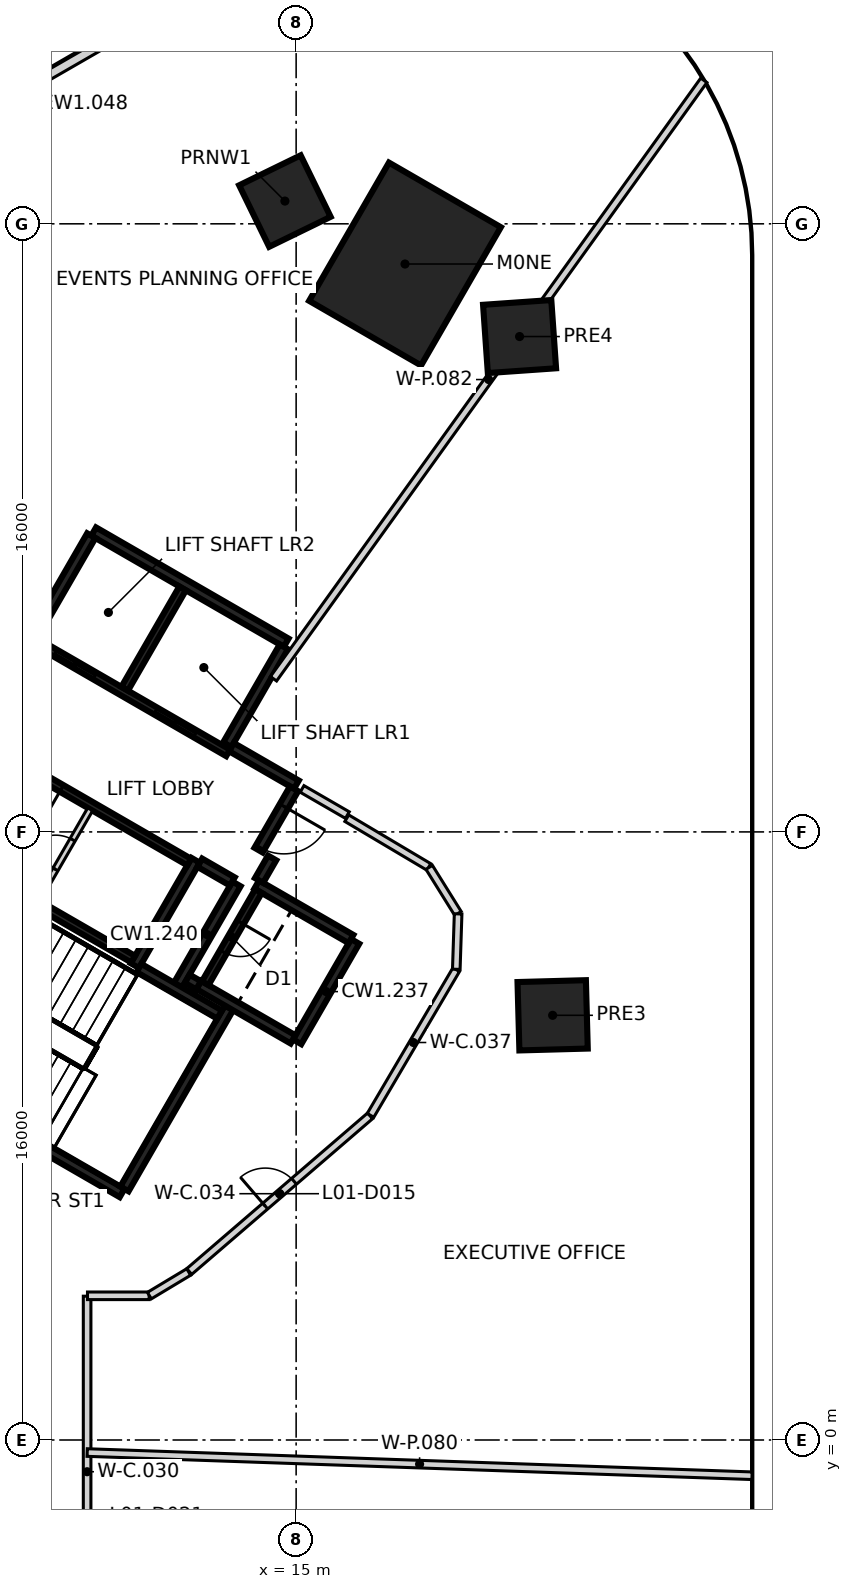
"""IFC4 building model, lengths in metres.
Left out: names, types, materials, properties, quantities, classifications, styles, units other than length and angle.
Written with IfcOpenShell. Run it as: python <this file> out.ifc"""

import sys

from ifc_helpers import new_model, si_unit, direction, frame, frame_2d, origin, origin_2d, place, context, subcontext, project, spatial, polyline, rectangle, outline, extrude, element, fill, save


model = new_model("IFC4")
c1 = context("Model", 3, precision=1e-05, world=origin(), true_north=direction((0.0, 1.0)))
c2 = subcontext(c1, "Body", "Model", "MODEL_VIEW")
j1 = project(units=[si_unit("LENGTHUNIT", "METRE"), si_unit("PLANEANGLEUNIT", "RADIAN")], contexts=[c1])
p1 = place(None, origin())
s1 = spatial("IfcSite", under=j1, at=p1, CompositionType="ELEMENT")
p2 = place(p1, origin())
s2 = spatial("IfcBuilding", under=s1, at=p2, CompositionType="ELEMENT")
p3 = place(p2, frame((0.0, 0.0, 7.5)))
s3 = spatial("IfcBuildingStorey", under=s2, at=p3, CompositionType="ELEMENT", Elevation=7.5)
p4 = place(p3, frame((17.865, 30.942, -0.4), z_axis=(0.0, 0.0, 1.0), x_axis=(0.5, 0.866025403784, 0.0)))
e1 = element("IfcColumn", 1, at=p4, inside=s3, PredefinedType="COLUMN", context=c2, shape_type="SweptSolid", body=[
    extrude(rectangle(XDim=4.2, YDim=3.4, at=origin_2d()), origin(), (0.0, 0.0, 1.0), 6.55),
])
for number, where, z_axis, x_axis in (
    (2, (21.749, 11.174, -0.4), (0.0, 0.0, 1.0), (1.0, 0.027, 0.0)),
    (3, (20.879, 29.034, -0.4), (0.0, 0.0, 1.0), (0.998, 0.07, 0.0)),
    (4, (14.705, 32.599, -0.4), (0.0, 0.0, 1.0), (-0.438, 0.899, 0.0)),
):
    element("IfcColumn", number, at=place(p3, frame(where, z_axis=z_axis, x_axis=x_axis)), inside=s3, PredefinedType="COLUMN", context=c2, shape_type="SweptSolid", body=[
        extrude(rectangle(XDim=1.8, YDim=1.8, at=origin_2d()), origin(), (0.0, 0.0, 1.0), 4.15),
    ])
p5 = place(p3, origin())
e5 = element("IfcWall", 5, at=p5, inside=s3, PredefinedType="SOLIDWALL", context=c2, shape_type="SweptSolid", body=[
    extrude(outline(polyline([(27.0, 31.177), (26.981, 31.766), (26.827, 32.933), (26.522, 34.07), (26.072, 35.157), (25.483, 36.177), (24.767, 37.111), (23.934, 37.943), (23.479, 38.317), (22.5, 38.971), (21.444, 39.492), (20.329, 39.87), (19.175, 40.1), (18.0, 40.177), (16.825, 40.1), (16.244, 40.004), (15.107, 39.699), (14.019, 39.249), (14.115, 39.018), (15.188, 39.462), (16.297, 39.759), (16.854, 39.851), (18.0, 39.926), (19.142, 39.852), (20.265, 39.628), (21.348, 39.26), (22.375, 38.754), (23.33, 38.116), (23.766, 37.758), (24.578, 36.946), (25.275, 36.038), (25.847, 35.047), (26.285, 33.989), (26.581, 32.884), (26.731, 31.745), (26.75, 31.169), (27.0, 31.177)])), origin(), (0.0, 0.0, 1.0), 6.15),
])
p6 = place(p3, frame((6.078, 34.524, 0.0), z_axis=(0.0, 0.0, 1.0), x_axis=(0.866216377649, 0.499669077583, 0.0)))
e6 = element("IfcWall", 6, at=p6, inside=s3, PredefinedType="SOLIDWALL", context=c2, shape_type="SweptSolid", body=[
    extrude(rectangle(XDim=4.62, YDim=0.25, at=frame_2d((2.31, 0.0))), origin(), (0.0, 0.0, 1.0), 6.15),
])
p7 = place(p3, frame((10.42, 6.498, 0.0), z_axis=(0.0, 0.0, 1.0), x_axis=(-0.866021906294, 0.500006057782, 0.0)))
e7 = element("IfcWall", 7, at=p7, inside=s3, PredefinedType="SHEAR", context=c2, shape_type="SweptSolid", body=[
    extrude(rectangle(XDim=11.55, YDim=0.25, at=frame_2d((5.775, 0.0))), origin(), (0.0, 0.0, 1.0), 6.15),
])
p8 = place(p7, frame((10.025, 0.0, 0.0)))
e8 = element("IfcOpeningElement", 8, at=p8, cuts=e7, PredefinedType="OPENING", context=c2, shape_type="SweptSolid", body=[
    extrude(rectangle(XDim=1.2, YDim=2.1, at=frame_2d((0.6, 1.05))), frame((0.0, 0.135, 0.0), z_axis=(0.0, -1.0, 0.0), x_axis=(1.0, 0.0, 0.0)), (0.0, 0.0, 1.0), 0.27),
])
p9 = place(p7, frame((8.725, 0.0, 0.0)))
e9 = element("IfcOpeningElement", 9, at=p9, cuts=e7, PredefinedType="OPENING", context=c2, shape_type="SweptSolid", body=[
    extrude(rectangle(XDim=1.2, YDim=2.1, at=frame_2d((0.6, 1.05))), frame((0.0, 0.135, 0.0), z_axis=(0.0, -1.0, 0.0), x_axis=(1.0, 0.0, 0.0)), (0.0, 0.0, 1.0), 0.27),
])
p10 = place(p3, frame((9.673, 23.903, 0.0), z_axis=(0.0, 0.0, 1.0), x_axis=(0.86603616409, -0.499981362141, 0.0)))
e10 = element("IfcWall", 10, at=p10, inside=s3, PredefinedType="SHEAR", context=c2, shape_type="SweptSolid", body=[
    extrude(rectangle(XDim=5.85, YDim=0.25, at=frame_2d((2.925, 0.0))), origin(), (0.0, 0.0, 1.0), 6.15),
])
p11 = place(p3, frame((13.238, 11.378, 0.0), z_axis=(0.0, 0.0, 1.0), x_axis=(-0.500008851346, -0.866020293397, 0.0)))
e11 = element("IfcWall", 11, at=p11, inside=s3, PredefinedType="SHEAR", context=c2, shape_type="SweptSolid", body=[
    extrude(rectangle(XDim=5.51, YDim=0.25, at=frame_2d((2.755, 0.0))), origin(), (0.0, 0.0, 1.0), 6.15),
])
p12 = place(p3, frame((12.357, 15.252, 0.0), z_axis=(0.0, 0.0, 1.0), x_axis=(-0.500028443584, -0.866008981251, 0.0)))
e12 = element("IfcWall", 12, at=p12, inside=s3, PredefinedType="SHEAR", context=c2, shape_type="SweptSolid", body=[
    extrude(rectangle(XDim=3.2, YDim=0.25, at=frame_2d((1.6, 0.0))), origin(), (0.0, 0.0, 1.0), 6.15),
])
for number, where, z_axis, x_axis in (
    (13, (8.123, 21.219, 0.0), (0.0, 0.0, 1.0), (0.5, 0.866, 0.0)),
    (14, (14.676, 20.87, 0.0), (0.0, 0.0, 1.0), (-0.5, -0.866, 0.0)),
):
    element("IfcWall", number, at=place(p3, frame(where, z_axis=z_axis, x_axis=x_axis)), inside=s3, PredefinedType="SHEAR", context=c2, shape_type="SweptSolid", body=[
        extrude(rectangle(XDim=2.975, YDim=0.25, at=frame_2d((1.487, 0.0))), origin(), (0.0, 0.0, 1.0), 6.15),
    ])
p13 = place(p3, frame((16.552, 13.119, 0.0), z_axis=(0.0, 0.0, 1.0), x_axis=(-0.499978833458, -0.866037623948, 0.0)))
e15 = element("IfcWall", 15, at=p13, inside=s3, PredefinedType="SHEAR", context=c2, shape_type="SweptSolid", body=[
    extrude(rectangle(XDim=3.05, YDim=0.25, at=frame_2d((1.525, 0.0))), origin(), (0.0, 0.0, 1.0), 6.15),
])
p14 = place(p3, frame((14.918, 10.54, 0.0), z_axis=(0.0, 0.0, 1.0), x_axis=(-0.866063538972, 0.499933942099, 0.0)))
e16 = element("IfcWall", 16, at=p14, inside=s3, PredefinedType="SHEAR", context=c2, shape_type="SweptSolid", body=[
    extrude(rectangle(XDim=2.865, YDim=0.25, at=frame_2d((1.432, 0.0))), origin(), (0.0, 0.0, 1.0), 6.15),
])
p15 = place(p3, frame((13.963, 14.614, 0.0), z_axis=(0.0, 0.0, 1.0), x_axis=(0.866042235819, -0.499970844928, 0.0)))
e17 = element("IfcWall", 17, at=p15, inside=s3, PredefinedType="SHEAR", context=c2, shape_type="SweptSolid", body=[
    extrude(rectangle(XDim=2.865, YDim=0.25, at=frame_2d((1.432, 0.0))), origin(), (0.0, 0.0, 1.0), 6.15),
])
p16 = place(p3, frame((11.888, 11.961, 0.0), z_axis=(0.0, 0.0, 1.0), x_axis=(0.500003324108, 0.866023484601, 0.0)))
e18 = element("IfcWall", 18, at=p16, inside=s3, PredefinedType="SHEAR", context=c2, shape_type="SweptSolid", body=[
    extrude(rectangle(XDim=3.085, YDim=0.25, at=frame_2d((1.542, 0.0))), origin(), (0.0, 0.0, 1.0), 6.15),
])
p17 = place(p3, frame((10.865, 12.418, 0.0), z_axis=(0.0, 0.0, 1.0), x_axis=(0.866026229868, -0.499998569178, 0.0)))
e19 = element("IfcWall", 19, at=p17, inside=s3, PredefinedType="SHEAR", context=c2, shape_type="SweptSolid", body=[
    extrude(rectangle(XDim=2.449, YDim=0.25, at=frame_2d((1.225, 0.0))), origin(), (0.0, 0.0, 1.0), 6.15),
])
p18 = place(p3, frame((13.297, 18.231, 0.0), z_axis=(0.0, 0.0, 1.0), x_axis=(0.866043531843, -0.499968599967, 0.0)))
e20 = element("IfcWall", 20, at=p18, inside=s3, PredefinedType="SHEAR", context=c2, shape_type="SweptSolid", body=[
    extrude(rectangle(XDim=1.975, YDim=0.25, at=frame_2d((0.987, 0.0))), origin(), (0.0, 0.0, 1.0), 6.15),
])
p19 = place(p3, frame((14.945, 17.135, 0.0), z_axis=(0.0, 0.0, 1.0), x_axis=(-0.499983108224, -0.866035156036, 0.0)))
e21 = element("IfcWall", 21, at=p19, inside=s3, PredefinedType="SHEAR", context=c2, shape_type="SweptSolid", body=[
    extrude(rectangle(XDim=1.865, YDim=0.25, at=frame_2d((0.932, 0.0))), origin(), (0.0, 0.0, 1.0), 6.15),
])
p20 = place(p19, frame((0.535, 0.0, 0.0)))
e22 = element("IfcOpeningElement", 22, at=p20, cuts=e21, PredefinedType="OPENING", context=c2, shape_type="SweptSolid", body=[
    extrude(rectangle(XDim=1.25, YDim=2.1, at=frame_2d((0.625, 1.05))), frame((0.0, 0.135, 0.0), z_axis=(0.0, -1.0, 0.0), x_axis=(1.0, 0.0, 0.0)), (0.0, 0.0, 1.0), 0.27),
])
p21 = place(p3, frame((13.322, 14.695, 0.0), z_axis=(0.0, 0.0, 1.0), x_axis=(-0.866017078145, 0.500014420154, 0.0)))
e23 = element("IfcWall", 23, at=p21, inside=s3, PredefinedType="SHEAR", context=c2, shape_type="SweptSolid", body=[
    extrude(rectangle(XDim=0.989, YDim=0.25, at=frame_2d((0.495, 0.0))), origin(), (0.0, 0.0, 1.0), 6.15),
])
p22 = place(p3, frame((14.368, 15.315, 0.0), z_axis=(0.0, 0.0, 1.0), x_axis=(-0.499897359611, -0.866084655132, 0.0)))
e24 = element("IfcWall", 24, at=p22, inside=s3, PredefinedType="SHEAR", context=c2, shape_type="SweptSolid", body=[
    extrude(rectangle(XDim=0.685, YDim=0.25, at=frame_2d((0.342, 0.0))), origin(), (0.0, 0.0, 1.0), 6.15),
])
p23 = place(p3, frame((12.433, 11.964, 0.0), z_axis=(0.0, 0.0, 1.0), x_axis=(-0.866055875208, 0.499947218231, 0.0)))
e25 = element("IfcWall", 25, at=p23, inside=s3, PredefinedType="SHEAR", context=c2, shape_type="SweptSolid", body=[
    extrude(rectangle(XDim=0.345, YDim=0.25, at=frame_2d((0.172, 0.0))), origin(), (0.0, 0.0, 1.0), 6.15),
])
p24 = place(p3, frame((13.21, 18.08, 0.0), z_axis=(0.0, 0.0, 1.0), x_axis=(-0.866030299012, 0.499991521122, 0.0)))
e26 = element("IfcWall", 26, at=p24, inside=s3, PredefinedType="SHEAR", context=c2, shape_type="SweptSolid", body=[
    extrude(rectangle(XDim=6.1, YDim=0.2, at=frame_2d((3.05, 0.0))), origin(), (0.0, 0.0, 1.0), 6.15),
])
p25 = place(p24, frame((1.0, 0.0, 0.0)))
e27 = element("IfcOpeningElement", 27, at=p25, cuts=e26, PredefinedType="OPENING", context=c2, shape_type="SweptSolid", body=[
    extrude(rectangle(XDim=1.2, YDim=2.1, at=frame_2d((0.6, 1.05))), frame((0.0, 0.11, 0.0), z_axis=(0.0, -1.0, 0.0), x_axis=(1.0, 0.0, 0.0)), (0.0, 0.0, 1.0), 0.22),
])
p26 = place(p24, frame((4.05, 0.0, 0.0)))
e28 = element("IfcOpeningElement", 28, at=p26, cuts=e26, PredefinedType="OPENING", context=c2, shape_type="SweptSolid", body=[
    extrude(rectangle(XDim=1.2, YDim=2.1, at=frame_2d((0.6, 1.05))), frame((0.0, 0.11, 0.0), z_axis=(0.0, -1.0, 0.0), x_axis=(1.0, 0.0, 0.0)), (0.0, 0.0, 1.0), 0.22),
])
p27 = place(p3, frame((5.775, 15.502, 0.0), z_axis=(0.0, 0.0, 1.0), x_axis=(0.866020080793, -0.500009219579, 0.0)))
e29 = element("IfcWall", 29, at=p27, inside=s3, PredefinedType="SHEAR", context=c2, shape_type="SweptSolid", body=[
    extrude(rectangle(XDim=5.699, YDim=0.2, at=frame_2d((2.85, 0.0))), origin(), (0.0, 0.0, 1.0), 6.15),
])
p28 = place(p3, frame((12.185, 15.207, 0.0), z_axis=(0.0, 0.0, 1.0), x_axis=(-0.866020080793, 0.500009219579, 0.0)))
e30 = element("IfcWall", 30, at=p28, inside=s3, PredefinedType="SHEAR", context=c2, shape_type="SweptSolid", body=[
    extrude(rectangle(XDim=5.699, YDim=0.2, at=frame_2d((2.85, 0.0))), origin(), (0.0, 0.0, 1.0), 6.15),
])
p29 = place(p28, frame((3.874, 0.0, 0.0)))
e31 = element("IfcOpeningElement", 31, at=p29, cuts=e30, PredefinedType="OPENING", context=c2, shape_type="SweptSolid", body=[
    extrude(rectangle(XDim=0.9, YDim=2.1, at=frame_2d((0.45, 1.05))), frame((0.0, 0.11, 0.0), z_axis=(0.0, -1.0, 0.0), x_axis=(1.0, 0.0, 0.0)), (0.0, 0.0, 1.0), 0.22),
])
p30 = place(p3, frame((10.489, 19.767, 0.0), z_axis=(0.0, 0.0, 1.0), x_axis=(0.499946628782, 0.866056215479, 0.0)))
e32 = element("IfcWall", 32, at=p30, inside=s3, PredefinedType="SHEAR", context=c2, shape_type="SweptSolid", body=[
    extrude(rectangle(XDim=3.048, YDim=0.2, at=frame_2d((1.524, 0.0))), origin(), (0.0, 0.0, 1.0), 6.15),
])
p31 = place(p3, frame((14.008, 14.442, 0.0), z_axis=(0.0, 0.0, 1.0), x_axis=(-0.499986818241, -0.866033014143, 0.0)))
e33 = element("IfcWall", 33, at=p31, inside=s3, PredefinedType="SHEAR", context=c2, shape_type="SweptSolid", body=[
    extrude(rectangle(XDim=2.798, YDim=0.2, at=frame_2d((1.399, 0.0))), origin(), (0.0, 0.0, 1.0), 6.15),
])
p32 = place(p31, frame((0.949, 0.0, 0.0)))
e34 = element("IfcOpeningElement", 34, at=p32, cuts=e33, PredefinedType="OPENING", context=c2, shape_type="SweptSolid", body=[
    extrude(rectangle(XDim=0.9, YDim=2.1, at=frame_2d((0.45, 1.05))), frame((0.0, 0.11, 0.0), z_axis=(0.0, -1.0, 0.0), x_axis=(1.0, 0.0, 0.0)), (0.0, 0.0, 1.0), 0.22),
])
p33 = place(p3, frame((8.207, 14.214, 0.0), z_axis=(0.0, 0.0, 1.0), x_axis=(0.499922376475, 0.866070215109, 0.0)))
e35 = element("IfcWall", 35, at=p33, inside=s3, PredefinedType="PARTITIONING", context=c2, shape_type="SweptSolid", body=[
    extrude(rectangle(XDim=2.749, YDim=0.15, at=frame_2d((1.374, 0.0))), origin(), (0.0, 0.0, 1.0), 6.15),
])
p34 = place(p33, frame((0.924, 0.0, 0.0)))
e36 = element("IfcOpeningElement", 36, at=p34, cuts=e35, PredefinedType="OPENING", context=c2, shape_type="SweptSolid", body=[
    extrude(rectangle(XDim=0.9, YDim=2.1, at=frame_2d((0.45, 1.05))), frame((0.0, 0.085, 0.0), z_axis=(0.0, -1.0, 0.0), x_axis=(1.0, 0.0, 0.0)), (0.0, 0.0, 1.0), 0.17),
])
p35 = place(p3, frame((9.5, -5.454, 0.0), z_axis=(0.0, 0.0, 1.0), x_axis=(0.0, 1.0, 0.0)))
e37 = element("IfcWall", 37, at=p35, inside=s3, PredefinedType="PARTITIONING", context=c2, shape_type="SweptSolid", body=[
    extrude(rectangle(XDim=9.238, YDim=0.2, at=frame_2d((4.619, 0.0))), origin(), (0.0, 0.0, 1.0), 6.15),
])
p36 = place(p35, frame((2.067, 0.0, 0.0)))
e38 = element("IfcOpeningElement", 38, at=p36, cuts=e37, PredefinedType="OPENING", context=c2, shape_type="SweptSolid", body=[
    extrude(rectangle(XDim=1.0, YDim=2.1, at=frame_2d((0.5, 1.05))), frame((0.0, 0.11, 0.0), z_axis=(0.0, -1.0, 0.0), x_axis=(1.0, 0.0, 0.0)), (0.0, 0.0, 1.0), 0.22),
])
p37 = place(p3, frame((9.51, 3.794, 0.0), z_axis=(0.0, 0.0, 1.0), x_axis=(1.0, 0.0, 0.0)))
e39 = element("IfcWall", 39, at=p37, inside=s3, PredefinedType="PARTITIONING", context=c2, shape_type="SweptSolid", body=[
    extrude(rectangle(XDim=1.622, YDim=0.2, at=frame_2d((0.811, 0.0))), origin(), (0.0, 0.0, 1.0), 6.15),
])
p38 = place(p3, frame((11.138, 3.799, 0.0), z_axis=(0.0, 0.0, 1.0), x_axis=(0.857225224173, 0.514941661785, 0.0)))
e40 = element("IfcWall", 40, at=p38, inside=s3, PredefinedType="PARTITIONING", context=c2, shape_type="SweptSolid", body=[
    extrude(rectangle(XDim=1.208, YDim=0.2, at=frame_2d((0.604, 0.0))), origin(), (0.0, 0.0, 1.0), 6.15),
])
p39 = place(p3, frame((12.187, 4.433, 0.0), z_axis=(0.0, 0.0, 1.0), x_axis=(0.757945584444, 0.652317783769, 0.0)))
e41 = element("IfcWall", 41, at=p39, inside=s3, PredefinedType="PARTITIONING", context=c2, shape_type="SweptSolid", body=[
    extrude(rectangle(XDim=6.278, YDim=0.2, at=frame_2d((3.139, 0.0))), origin(), (0.0, 0.0, 1.0), 6.15),
])
p40 = place(p39, frame((2.639, 0.0, 0.0)))
e42 = element("IfcOpeningElement", 42, at=p40, cuts=e41, PredefinedType="OPENING", context=c2, shape_type="SweptSolid", body=[
    extrude(rectangle(XDim=1.0, YDim=2.1, at=frame_2d((0.5, 1.05))), frame((0.0, 0.11, 0.0), z_axis=(0.0, -1.0, 0.0), x_axis=(1.0, 0.0, 0.0)), (0.0, 0.0, 1.0), 0.22),
])
p41 = place(p3, frame((15.156, 17.131, 0.0), z_axis=(0.0, 0.0, 1.0), x_axis=(0.865567897455, -0.500791588284, 0.0)))
e43 = element("IfcWall", 43, at=p41, inside=s3, PredefinedType="PARTITIONING", context=c2, shape_type="SweptSolid", body=[
    extrude(rectangle(XDim=1.377, YDim=0.2, at=frame_2d((0.688, 0.0))), origin(), (0.0, 0.0, 1.0), 6.15),
])
p42 = place(p3, frame((16.333, 16.361, 0.0), z_axis=(0.0, 0.0, 1.0), x_axis=(0.859621281652, -0.510931748995, 0.0)))
e44 = element("IfcWall", 44, at=p42, inside=s3, PredefinedType="PARTITIONING", context=c2, shape_type="SweptSolid", body=[
    extrude(rectangle(XDim=2.511, YDim=0.2, at=frame_2d((1.256, 0.0))), origin(), (0.0, 0.0, 1.0), 6.15),
])
p43 = place(p3, frame((16.957, 8.542, 0.0), z_axis=(0.0, 0.0, 1.0), x_axis=(0.506952960322, 0.861973721189, 0.0)))
e45 = element("IfcWall", 45, at=p43, inside=s3, PredefinedType="PARTITIONING", context=c2, shape_type="SweptSolid", body=[
    extrude(rectangle(XDim=4.448, YDim=0.2, at=frame_2d((2.224, 0.0))), origin(), (0.0, 0.0, 1.0), 6.15),
])
p44 = place(p3, frame((18.501, 15.068, 0.0), z_axis=(0.0, 0.0, 1.0), x_axis=(0.529124417946, -0.84854425361, 0.0)))
e46 = element("IfcWall", 46, at=p44, inside=s3, PredefinedType="PARTITIONING", context=c2, shape_type="SweptSolid", body=[
    extrude(rectangle(XDim=1.431, YDim=0.2, at=frame_2d((0.715, 0.0))), origin(), (0.0, 0.0, 1.0), 6.15),
])
p45 = place(p3, frame((19.214, 12.385, 0.0), z_axis=(0.0, 0.0, 1.0), x_axis=(0.032802164331, 0.999461864213, 0.0)))
e47 = element("IfcWall", 47, at=p45, inside=s3, PredefinedType="PARTITIONING", context=c2, shape_type="SweptSolid", body=[
    extrude(rectangle(XDim=1.459, YDim=0.2, at=frame_2d((0.729, 0.0))), origin(), (0.0, 0.0, 1.0), 6.15),
])
p46 = place(p3, frame((9.502, -0.33, 0.0), z_axis=(0.0, 0.0, 1.0), x_axis=(0.999391869081, -0.034869643174, 0.0)))
e48 = element("IfcWall", 48, at=p46, inside=s3, PredefinedType="PARTITIONING", context=c2, shape_type="SweptSolid", body=[
    extrude(rectangle(XDim=17.504, YDim=0.2, at=frame_2d((8.752, 0.0))), origin(), (0.0, 0.0, 1.0), 3.75),
])
p47 = place(p3, frame((14.405, 20.029, 0.0), z_axis=(0.0, 0.0, 1.0), x_axis=(0.583802556312, 0.811895667709, 0.0)))
e49 = element("IfcWall", 49, at=p47, inside=s3, PredefinedType="PARTITIONING", context=c2, shape_type="SweptSolid", body=[
    extrude(rectangle(XDim=19.395, YDim=0.2, at=frame_2d((9.697, 0.0))), origin(), (0.0, 0.0, 1.0), 3.75),
])
p48 = place(p25, origin())
e50 = element("IfcDoor", 50, at=p48, inside=s3, OperationType="DOUBLE_DOOR_SLIDING", PredefinedType="DOOR", context=c2, shape_type="SweptSolid", body=[
    extrude(rectangle(XDim=1.2, YDim=2.1, at=frame_2d((0.6, 1.05))), frame((0.0, 0.025, 0.0), z_axis=(0.0, -1.0, 0.0), x_axis=(1.0, 0.0, 0.0)), (0.0, 0.0, 1.0), 0.05),
])
fill(e27, e50)
p49 = place(p26, origin())
e51 = element("IfcDoor", 51, at=p49, inside=s3, OperationType="DOUBLE_DOOR_SLIDING", PredefinedType="DOOR", context=c2, shape_type="SweptSolid", body=[
    extrude(rectangle(XDim=1.2, YDim=2.1, at=frame_2d((0.6, 1.05))), frame((0.0, 0.025, 0.0), z_axis=(0.0, -1.0, 0.0), x_axis=(1.0, 0.0, 0.0)), (0.0, 0.0, 1.0), 0.05),
])
fill(e28, e51)
p50 = place(p20, origin())
e52 = element("IfcDoor", 52, at=p50, inside=s3, OperationType="SINGLE_SWING_LEFT", PredefinedType="DOOR", context=c2, shape_type="SweptSolid", body=[
    extrude(rectangle(XDim=1.25, YDim=2.1, at=frame_2d((0.625, 1.05))), frame((0.0, 0.025, 0.0), z_axis=(0.0, -1.0, 0.0), x_axis=(1.0, 0.0, 0.0)), (0.0, 0.0, 1.0), 0.05),
])
fill(e22, e52)
p51 = place(p29, origin())
e53 = element("IfcDoor", 53, at=p51, inside=s3, OperationType="SINGLE_SWING_LEFT", PredefinedType="DOOR", context=c2, shape_type="SweptSolid", body=[
    extrude(rectangle(XDim=0.9, YDim=2.1, at=frame_2d((0.45, 1.05))), frame((0.0, 0.025, 0.0), z_axis=(0.0, -1.0, 0.0), x_axis=(1.0, 0.0, 0.0)), (0.0, 0.0, 1.0), 0.05),
])
fill(e31, e53)
p52 = place(p32, origin())
e54 = element("IfcDoor", 54, at=p52, inside=s3, OperationType="SINGLE_SWING_RIGHT", PredefinedType="DOOR", context=c2, shape_type="SweptSolid", body=[
    extrude(rectangle(XDim=0.9, YDim=2.1, at=frame_2d((0.45, 1.05))), frame((0.0, 0.025, 0.0), z_axis=(0.0, -1.0, 0.0), x_axis=(1.0, 0.0, 0.0)), (0.0, 0.0, 1.0), 0.05),
])
fill(e34, e54)
p53 = place(p34, origin())
e55 = element("IfcDoor", 55, at=p53, inside=s3, OperationType="SINGLE_SWING_LEFT", PredefinedType="DOOR", context=c2, shape_type="SweptSolid", body=[
    extrude(rectangle(XDim=0.9, YDim=2.1, at=frame_2d((0.45, 1.05))), frame((0.0, 0.025, 0.0), z_axis=(0.0, -1.0, 0.0), x_axis=(1.0, 0.0, 0.0)), (0.0, 0.0, 1.0), 0.05),
])
fill(e36, e55)
p54 = place(p40, origin())
e56 = element("IfcDoor", 56, at=p54, inside=s3, OperationType="SINGLE_SWING_LEFT", PredefinedType="DOOR", context=c2, shape_type="SweptSolid", body=[
    extrude(rectangle(XDim=1.0, YDim=2.1, at=frame_2d((0.5, 1.05))), frame((0.0, 0.025, 0.0), z_axis=(0.0, -1.0, 0.0), x_axis=(1.0, 0.0, 0.0)), (0.0, 0.0, 1.0), 0.05),
])
fill(e42, e56)
save(model, sys.argv[1])
